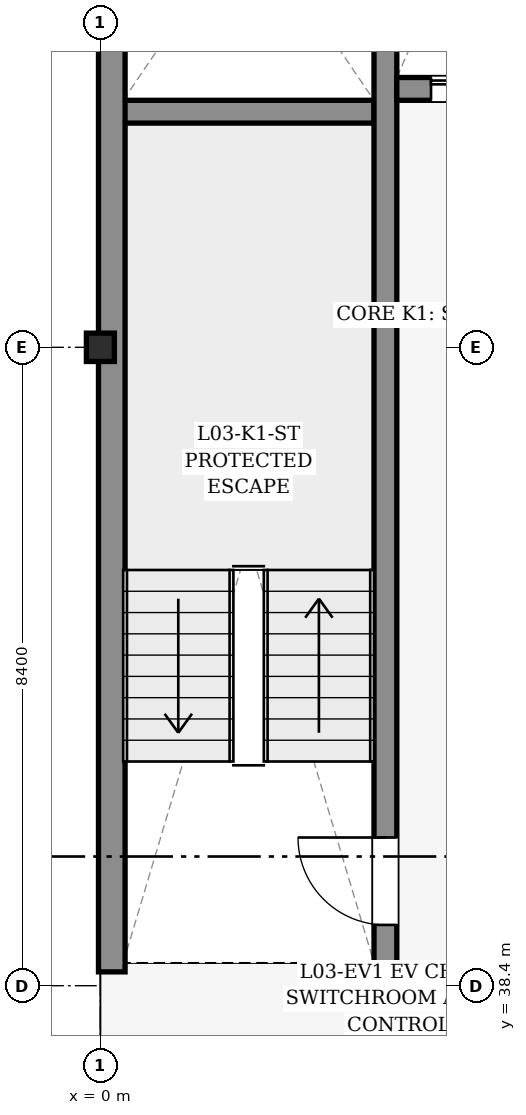
"""IFC4 building model, lengths in metres.
Left out: names, types, materials, properties, quantities, classifications, styles, units other than length and angle.
Written with IfcOpenShell. Run it as: python <this file> out.ifc"""

import sys

from ifc_helpers import new_model, si_unit, direction, frame, frame_2d, origin, origin_2d, place, context, subcontext, project, spatial, rectangle, i_section, extrude, element, fill, save


model = new_model("IFC4")
c1 = context("Model", 3, precision=1e-05, world=origin(), true_north=direction((0.0, 1.0)))
c2 = subcontext(c1, "Body", "Model", "MODEL_VIEW")
j1 = project(units=[si_unit("LENGTHUNIT", "METRE"), si_unit("PLANEANGLEUNIT", "RADIAN")], contexts=[c1])
p1 = place(None, origin())
s1 = spatial("IfcSite", under=j1, at=p1, CompositionType="ELEMENT")
p2 = place(p1, origin())
s2 = spatial("IfcBuilding", under=s1, at=p2, CompositionType="ELEMENT")
p3 = place(p2, frame((0.0, 0.0, 12.6)))
s3 = spatial("IfcBuildingStorey", under=s2, at=p3, CompositionType="ELEMENT", Elevation=12.6)
for number, where, z_axis, x_axis in (
    (1, (0.0, 38.4, 0.0), (0.0, 0.0, 1.0), (1.0, 0.0, 0.0)),
    (2, (0.0, 46.8, 0.0), (0.0, 0.0, 1.0), (1.0, 0.0, 0.0)),
):
    element("IfcColumn", number, at=place(p3, frame(where, z_axis=z_axis, x_axis=x_axis)), inside=s3, PredefinedType="COLUMN", context=c2, shape_type="SweptSolid", body=[
        extrude(i_section(OverallWidth=0.373, OverallDepth=0.368, WebThickness=0.014, FlangeThickness=0.024, FilletRadius=0.015, at=origin_2d()), origin(), (0.0, 0.0, 1.0), 3.6),
    ])
p4 = place(p3, frame((0.185, 38.55, 0.0), z_axis=(0.0, 0.0, 1.0), x_axis=(1.0, 0.0, 0.0)))
e3 = element("IfcWall", 3, at=p4, inside=s3, PredefinedType="SHEAR", context=c2, shape_type="SweptSolid", body=[
    extrude(rectangle(XDim=8.031, YDim=0.3, at=frame_2d((4.016, 0.0))), origin(), (0.0, 0.0, 1.0), 3.38),
])
p5 = place(p3, frame((0.3, 49.9, 0.0), z_axis=(0.0, 0.0, 1.0), x_axis=(1.0, 0.0, 0.0)))
e4 = element("IfcWall", 4, at=p5, inside=s3, PredefinedType="SHEAR", context=c2, shape_type="SweptSolid", body=[
    extrude(rectangle(XDim=3.3, YDim=0.3, at=frame_2d((1.65, 0.0))), origin(), (0.0, 0.0, 1.0), 3.38),
])
p6 = place(p3, frame((0.15, 38.582, 0.0), z_axis=(0.0, 0.0, 1.0), x_axis=(0.0, 1.0, 0.0)))
e5 = element("IfcWall", 5, at=p6, inside=s3, PredefinedType="SHEAR", context=c2, shape_type="SweptSolid", body=[
    extrude(rectangle(XDim=16.436, YDim=0.35, at=frame_2d((8.218, 0.0))), origin(), (0.0, 0.0, 1.0), 3.38),
])
p7 = place(p3, frame((3.75, 38.7, 0.0), z_axis=(0.0, 0.0, 1.0), x_axis=(0.0, 1.0, 0.0)))
e6 = element("IfcWall", 6, at=p7, inside=s3, PredefinedType="SHEAR", context=c2, shape_type="SweptSolid", body=[
    extrude(rectangle(XDim=16.2, YDim=0.3, at=frame_2d((8.1, 0.0))), origin(), (0.0, 0.0, 1.0), 3.38),
])
p8 = place(p7, frame((0.5, 0.0, 0.0)))
e7 = element("IfcOpeningElement", 7, at=p8, cuts=e6, PredefinedType="OPENING", context=c2, shape_type="SweptSolid", body=[
    extrude(rectangle(XDim=1.15, YDim=2.15, at=frame_2d((0.575, 1.075))), frame((0.0, 0.16, 0.0), z_axis=(0.0, -1.0, 0.0), x_axis=(1.0, 0.0, 0.0)), (0.0, 0.0, 1.0), 0.32),
])
p9 = place(p3, frame((3.9, 50.2, 0.0), z_axis=(0.0, 0.0, 1.0), x_axis=(1.0, 0.0, 0.0)))
e8 = element("IfcWall", 8, at=p9, inside=s3, PredefinedType="SHEAR", context=c2, shape_type="SweptSolid", body=[
    extrude(rectangle(XDim=4.2, YDim=0.3, at=frame_2d((2.1, 0.0))), origin(), (0.0, 0.0, 1.0), 3.38),
])
p10 = place(p9, frame((0.45, 0.0, 0.0)))
e9 = element("IfcOpeningElement", 9, at=p10, cuts=e8, PredefinedType="OPENING", context=c2, shape_type="SweptSolid", body=[
    extrude(rectangle(XDim=1.1, YDim=2.2, at=frame_2d((0.55, 1.1))), frame((0.0, 0.16, 0.0), z_axis=(0.0, -1.0, 0.0), x_axis=(1.0, 0.0, 0.0)), (0.0, 0.0, 1.0), 0.32),
])
p11 = place(p9, frame((2.65, 0.0, 0.0)))
e10 = element("IfcOpeningElement", 10, at=p11, cuts=e8, PredefinedType="OPENING", context=c2, shape_type="SweptSolid", body=[
    extrude(rectangle(XDim=1.1, YDim=2.2, at=frame_2d((0.55, 1.1))), frame((0.0, 0.16, 0.0), z_axis=(0.0, -1.0, 0.0), x_axis=(1.0, 0.0, 0.0)), (0.0, 0.0, 1.0), 0.32),
])
p12 = place(p8, frame((1.15, 0.0, 0.0), z_axis=(0.0, 0.0, 1.0), x_axis=(-1.0, 0.0, 0.0)))
e11 = element("IfcDoor", 11, at=p12, inside=s3, OperationType="SINGLE_SWING_LEFT", PredefinedType="DOOR", context=c2, shape_type="SweptSolid", body=[
    extrude(rectangle(XDim=1.15, YDim=2.15, at=frame_2d((0.575, 1.075))), frame((0.0, 0.025, 0.0), z_axis=(0.0, -1.0, 0.0), x_axis=(1.0, 0.0, 0.0)), (0.0, 0.0, 1.0), 0.05),
])
fill(e7, e11)
p13 = place(p10, origin())
e12 = element("IfcDoor", 12, at=p13, inside=s3, OperationType="SLIDING_TO_LEFT", PredefinedType="DOOR", context=c2, shape_type="SweptSolid", body=[
    extrude(rectangle(XDim=1.1, YDim=2.2, at=frame_2d((0.55, 1.1))), frame((0.0, 0.025, 0.0), z_axis=(0.0, -1.0, 0.0), x_axis=(1.0, 0.0, 0.0)), (0.0, 0.0, 1.0), 0.05),
])
fill(e9, e12)
save(model, sys.argv[1])
